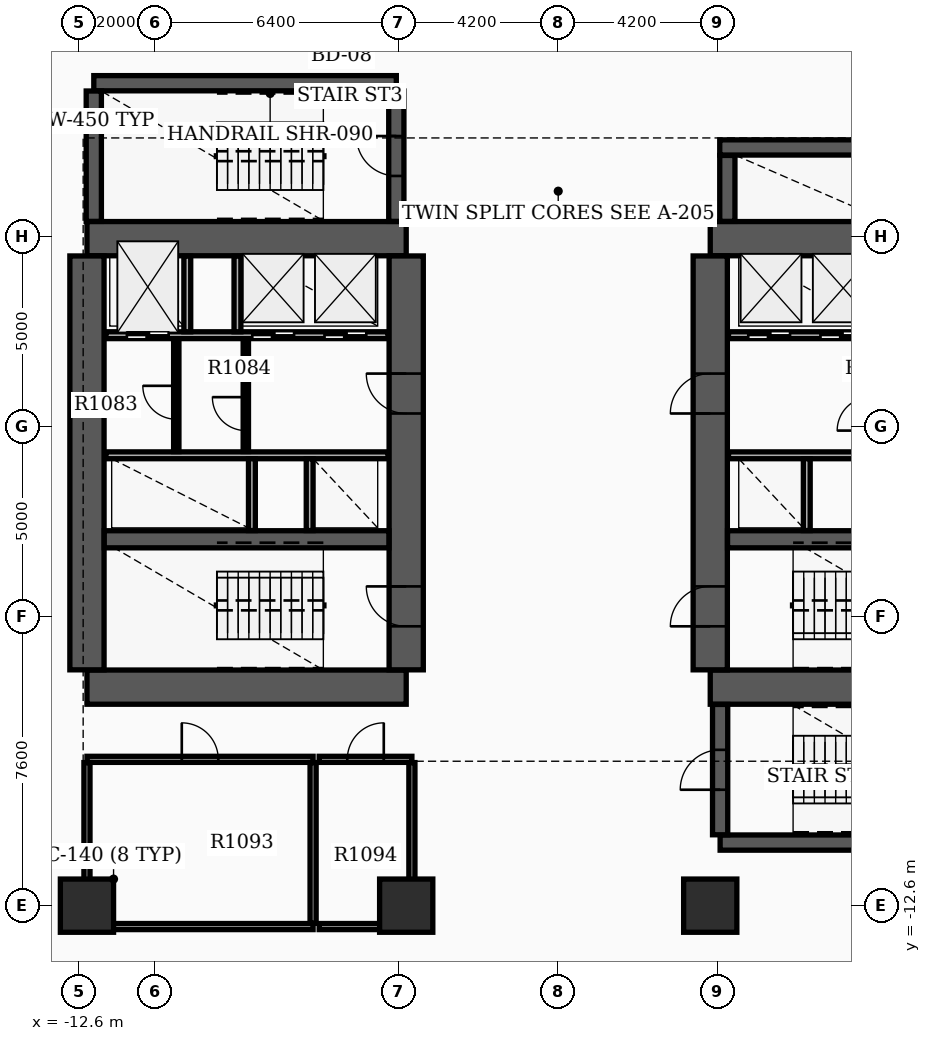
"""IFC4 building model, lengths in metres.
Left out: names, types, materials, properties, quantities, classifications, styles, units other than length and angle.
Written with IfcOpenShell. Run it as: python <this file> out.ifc"""

import sys

from ifc_helpers import new_model, si_unit, direction, frame, frame_2d, origin, origin_2d, place, context, subcontext, project, spatial, rectangle, extrude, element, fill, save


model = new_model("IFC4")
c1 = context("Model", 3, precision=1e-05, world=origin(), true_north=direction((0.0, 1.0)))
c2 = subcontext(c1, "Body", "Model", "MODEL_VIEW")
j1 = project(units=[si_unit("LENGTHUNIT", "METRE"), si_unit("PLANEANGLEUNIT", "RADIAN")], contexts=[c1])
p1 = place(None, origin())
s1 = spatial("IfcSite", under=j1, at=p1, CompositionType="ELEMENT")
p2 = place(p1, origin())
s2 = spatial("IfcBuilding", under=s1, at=p2, CompositionType="ELEMENT")
p3 = place(p2, frame((0.0, 0.0, 71.7)))
s3 = spatial("IfcBuildingStorey", under=s2, at=p3, CompositionType="ELEMENT", Elevation=71.7)
for number, where, z_axis, x_axis in (
    (1, (-12.4, -6.85, 0.0), (0.0, 0.0, 1.0), (1.0, 0.0, 0.0)),
    (2, (-12.4, 4.95, 0.0), (0.0, 0.0, 1.0), (1.0, 0.0, 0.0)),
):
    element("IfcWall", number, at=place(p3, frame(where, z_axis=z_axis, x_axis=x_axis)), inside=s3, PredefinedType="SHEAR", context=c2, shape_type="SweptSolid", body=[
        extrude(rectangle(XDim=8.4, YDim=0.9, at=frame_2d((4.2, 0.0))), origin(), (0.0, 0.0, 1.0), 3.7),
    ])
p4 = place(p3, frame((-12.4, -6.395, 0.0), z_axis=(0.0, 0.0, 1.0), x_axis=(0.0, 1.0, 0.0)))
e3 = element("IfcWall", 3, at=p4, inside=s3, PredefinedType="SHEAR", context=c2, shape_type="SweptSolid", body=[
    extrude(rectangle(XDim=10.89, YDim=0.9, at=frame_2d((5.445, 0.0))), origin(), (0.0, 0.0, 1.0), 3.7),
])
p5 = place(p3, frame((-4.0, -6.395, 0.0), z_axis=(0.0, 0.0, 1.0), x_axis=(0.0, 1.0, 0.0)))
e4 = element("IfcWall", 4, at=p5, inside=s3, PredefinedType="SHEAR", context=c2, shape_type="SweptSolid", body=[
    extrude(rectangle(XDim=10.89, YDim=0.9, at=frame_2d((5.445, 0.0))), origin(), (0.0, 0.0, 1.0), 3.7),
])
p6 = place(p5, frame((1.145, 0.0, 0.0)))
e5 = element("IfcOpeningElement", 5, at=p6, cuts=e4, PredefinedType="OPENING", context=c2, shape_type="SweptSolid", body=[
    extrude(rectangle(XDim=1.05, YDim=2.15, at=frame_2d((0.525, 1.075))), frame((0.0, 0.46, 0.0), z_axis=(0.0, -1.0, 0.0), x_axis=(1.0, 0.0, 0.0)), (0.0, 0.0, 1.0), 0.92),
])
p7 = place(p5, frame((6.745, 0.0, 0.0)))
e6 = element("IfcOpeningElement", 6, at=p7, cuts=e4, PredefinedType="OPENING", context=c2, shape_type="SweptSolid", body=[
    extrude(rectangle(XDim=1.05, YDim=2.15, at=frame_2d((0.525, 1.075))), frame((0.0, 0.46, 0.0), z_axis=(0.0, -1.0, 0.0), x_axis=(1.0, 0.0, 0.0)), (0.0, 0.0, 1.0), 0.92),
])
p8 = place(p3, frame((-11.945, -2.96, 0.0), z_axis=(0.0, 0.0, 1.0), x_axis=(1.0, 0.0, 0.0)))
e7 = element("IfcWall", 7, at=p8, inside=s3, PredefinedType="SHEAR", context=c2, shape_type="SweptSolid", body=[
    extrude(rectangle(XDim=7.49, YDim=0.45, at=frame_2d((3.745, 0.0))), origin(), (0.0, 0.0, 1.0), 3.7),
])
for number, where, z_axis, x_axis in (
    (8, (4.0, -6.85, 0.0), (0.0, 0.0, 1.0), (1.0, 0.0, 0.0)),
    (9, (4.0, 4.95, 0.0), (0.0, 0.0, 1.0), (1.0, 0.0, 0.0)),
):
    element("IfcWall", number, at=place(p3, frame(where, z_axis=z_axis, x_axis=x_axis)), inside=s3, PredefinedType="SHEAR", context=c2, shape_type="SweptSolid", body=[
        extrude(rectangle(XDim=8.4, YDim=0.9, at=frame_2d((4.2, 0.0))), origin(), (0.0, 0.0, 1.0), 3.7),
    ])
p9 = place(p3, frame((4.0, -6.395, 0.0), z_axis=(0.0, 0.0, 1.0), x_axis=(0.0, 1.0, 0.0)))
e10 = element("IfcWall", 10, at=p9, inside=s3, PredefinedType="SHEAR", context=c2, shape_type="SweptSolid", body=[
    extrude(rectangle(XDim=10.89, YDim=0.9, at=frame_2d((5.445, 0.0))), origin(), (0.0, 0.0, 1.0), 3.7),
])
p10 = place(p9, frame((1.145, 0.0, 0.0)))
e11 = element("IfcOpeningElement", 11, at=p10, cuts=e10, PredefinedType="OPENING", context=c2, shape_type="SweptSolid", body=[
    extrude(rectangle(XDim=1.05, YDim=2.15, at=frame_2d((0.525, 1.075))), frame((0.0, 0.46, 0.0), z_axis=(0.0, -1.0, 0.0), x_axis=(1.0, 0.0, 0.0)), (0.0, 0.0, 1.0), 0.92),
])
p11 = place(p9, frame((6.745, 0.0, 0.0)))
e12 = element("IfcOpeningElement", 12, at=p11, cuts=e10, PredefinedType="OPENING", context=c2, shape_type="SweptSolid", body=[
    extrude(rectangle(XDim=1.05, YDim=2.15, at=frame_2d((0.525, 1.075))), frame((0.0, 0.46, 0.0), z_axis=(0.0, -1.0, 0.0), x_axis=(1.0, 0.0, 0.0)), (0.0, 0.0, 1.0), 0.92),
])
p12 = place(p3, frame((4.455, -2.96, 0.0), z_axis=(0.0, 0.0, 1.0), x_axis=(1.0, 0.0, 0.0)))
e13 = element("IfcWall", 13, at=p12, inside=s3, PredefinedType="SHEAR", context=c2, shape_type="SweptSolid", body=[
    extrude(rectangle(XDim=7.49, YDim=0.45, at=frame_2d((3.745, 0.0))), origin(), (0.0, 0.0, 1.0), 3.7),
])
p13 = place(p3, frame((-12.22, 9.04, 0.0), z_axis=(0.0, 0.0, 1.0), x_axis=(1.0, 0.0, 0.0)))
e14 = element("IfcWall", 14, at=p13, inside=s3, PredefinedType="SHEAR", context=c2, shape_type="SweptSolid", body=[
    extrude(rectangle(XDim=7.96, YDim=0.4, at=frame_2d((3.98, 0.0))), origin(), (0.0, 0.0, 1.0), 3.7),
])
p14 = place(p3, frame((-12.22, 5.405, 0.0), z_axis=(0.0, 0.0, 1.0), x_axis=(0.0, 1.0, 0.0)))
e15 = element("IfcWall", 15, at=p14, inside=s3, PredefinedType="SHEAR", context=c2, shape_type="SweptSolid", body=[
    extrude(rectangle(XDim=3.43, YDim=0.4, at=frame_2d((1.715, 0.0))), origin(), (0.0, 0.0, 1.0), 3.7),
])
p15 = place(p3, frame((-4.26, 5.405, 0.0), z_axis=(0.0, 0.0, 1.0), x_axis=(0.0, 1.0, 0.0)))
e16 = element("IfcWall", 16, at=p15, inside=s3, PredefinedType="SHEAR", context=c2, shape_type="SweptSolid", body=[
    extrude(rectangle(XDim=3.43, YDim=0.4, at=frame_2d((1.715, 0.0))), origin(), (0.0, 0.0, 1.0), 3.7),
])
p16 = place(p15, frame((1.195, 0.0, 0.0)))
e17 = element("IfcOpeningElement", 17, at=p16, cuts=e16, PredefinedType="OPENING", context=c2, shape_type="SweptSolid", body=[
    extrude(rectangle(XDim=1.05, YDim=2.15, at=frame_2d((0.525, 1.075))), frame((0.0, 0.21, 0.0), z_axis=(0.0, -1.0, 0.0), x_axis=(1.0, 0.0, 0.0)), (0.0, 0.0, 1.0), 0.42),
])
p17 = place(p3, frame((4.26, -10.94, 0.0), z_axis=(0.0, 0.0, 1.0), x_axis=(1.0, 0.0, 0.0)))
e18 = element("IfcWall", 18, at=p17, inside=s3, PredefinedType="SHEAR", context=c2, shape_type="SweptSolid", body=[
    extrude(rectangle(XDim=7.96, YDim=0.4, at=frame_2d((3.98, 0.0))), origin(), (0.0, 0.0, 1.0), 3.7),
])
p18 = place(p3, frame((4.26, -10.735, 0.0), z_axis=(0.0, 0.0, 1.0), x_axis=(0.0, 1.0, 0.0)))
e19 = element("IfcWall", 19, at=p18, inside=s3, PredefinedType="SHEAR", context=c2, shape_type="SweptSolid", body=[
    extrude(rectangle(XDim=3.43, YDim=0.4, at=frame_2d((1.715, 0.0))), origin(), (0.0, 0.0, 1.0), 3.7),
])
p19 = place(p18, frame((1.185, 0.0, 0.0)))
e20 = element("IfcOpeningElement", 20, at=p19, cuts=e19, PredefinedType="OPENING", context=c2, shape_type="SweptSolid", body=[
    extrude(rectangle(XDim=1.05, YDim=2.15, at=frame_2d((0.525, 1.075))), frame((0.0, 0.21, 0.0), z_axis=(0.0, -1.0, 0.0), x_axis=(1.0, 0.0, 0.0)), (0.0, 0.0, 1.0), 0.42),
])
p20 = place(p3, frame((4.45, 5.405, 0.0), z_axis=(0.0, 0.0, 1.0), x_axis=(0.0, 1.0, 0.0)))
e21 = element("IfcWall", 21, at=p20, inside=s3, PredefinedType="SHEAR", context=c2, shape_type="SweptSolid", body=[
    extrude(rectangle(XDim=1.735, YDim=0.4, at=frame_2d((0.867, 0.0))), origin(), (0.0, 0.0, 1.0), 3.7),
])
p21 = place(p3, frame((4.25, 7.35, 0.0), z_axis=(0.0, 0.0, 1.0), x_axis=(1.0, 0.0, 0.0)))
e22 = element("IfcWall", 22, at=p21, inside=s3, PredefinedType="SHEAR", context=c2, shape_type="SweptSolid", body=[
    extrude(rectangle(XDim=5.4, YDim=0.4, at=frame_2d((2.7, 0.0))), origin(), (0.0, 0.0, 1.0), 3.7),
])
for number, where, z_axis, x_axis in (
    (23, (-12.4, -12.6, 0.0), (0.0, 0.0, 1.0), (1.0, 0.0, 0.0)),
    (24, (-4.0, -12.6, 0.0), (0.0, 0.0, 1.0), (1.0, 0.0, 0.0)),
    (25, (4.0, -12.6, 0.0), (0.0, 0.0, 1.0), (1.0, 0.0, 0.0)),
):
    element("IfcColumn", number, at=place(p3, frame(where, z_axis=z_axis, x_axis=x_axis)), inside=s3, PredefinedType="COLUMN", context=c2, shape_type="SweptSolid", body=[
        extrude(rectangle(XDim=1.4, YDim=1.4, at=origin_2d()), origin(), (0.0, 0.0, 1.0), 3.9),
    ])
p22 = place(p3, frame((-11.9, 2.41, 0.0), z_axis=(0.0, 0.0, 1.0), x_axis=(1.0, 0.0, 0.0)))
e26 = element("IfcWall", 26, at=p22, inside=s3, PredefinedType="SOLIDWALL", context=c2, shape_type="SweptSolid", body=[
    extrude(rectangle(XDim=7.42, YDim=0.18, at=frame_2d((3.71, 0.0))), origin(), (0.0, 0.0, 1.0), 2.9),
])
p23 = place(p22, frame((0.55, 0.0, 0.0)))
e27 = element("IfcOpeningElement", 27, at=p23, cuts=e26, PredefinedType="OPENING", context=c2, shape_type="SweptSolid", body=[
    extrude(rectangle(XDim=1.1, YDim=2.15, at=frame_2d((0.55, 1.075))), frame((0.0, 0.1, 0.0), z_axis=(0.0, -1.0, 0.0), x_axis=(1.0, 0.0, 0.0)), (0.0, 0.0, 1.0), 0.2),
])
p24 = place(p22, frame((3.85, 0.0, 0.0)))
e28 = element("IfcOpeningElement", 28, at=p24, cuts=e26, PredefinedType="OPENING", context=c2, shape_type="SweptSolid", body=[
    extrude(rectangle(XDim=1.1, YDim=2.15, at=frame_2d((0.55, 1.075))), frame((0.0, 0.1, 0.0), z_axis=(0.0, -1.0, 0.0), x_axis=(1.0, 0.0, 0.0)), (0.0, 0.0, 1.0), 0.2),
])
p25 = place(p22, frame((5.75, 0.0, 0.0)))
e29 = element("IfcOpeningElement", 29, at=p25, cuts=e26, PredefinedType="OPENING", context=c2, shape_type="SweptSolid", body=[
    extrude(rectangle(XDim=1.1, YDim=2.15, at=frame_2d((0.55, 1.075))), frame((0.0, 0.1, 0.0), z_axis=(0.0, -1.0, 0.0), x_axis=(1.0, 0.0, 0.0)), (0.0, 0.0, 1.0), 0.2),
])
p26 = place(p3, frame((4.48, 2.41, 0.0), z_axis=(0.0, 0.0, 1.0), x_axis=(1.0, 0.0, 0.0)))
e30 = element("IfcWall", 30, at=p26, inside=s3, PredefinedType="SOLIDWALL", context=c2, shape_type="SweptSolid", body=[
    extrude(rectangle(XDim=7.42, YDim=0.18, at=frame_2d((3.71, 0.0))), origin(), (0.0, 0.0, 1.0), 2.9),
])
p27 = place(p26, frame((5.67, 0.0, 0.0)))
e31 = element("IfcOpeningElement", 31, at=p27, cuts=e30, PredefinedType="OPENING", context=c2, shape_type="SweptSolid", body=[
    extrude(rectangle(XDim=1.1, YDim=2.15, at=frame_2d((0.55, 1.075))), frame((0.0, 0.1, 0.0), z_axis=(0.0, -1.0, 0.0), x_axis=(1.0, 0.0, 0.0)), (0.0, 0.0, 1.0), 0.2),
])
p28 = place(p26, frame((0.52, 0.0, 0.0)))
e32 = element("IfcOpeningElement", 32, at=p28, cuts=e30, PredefinedType="OPENING", context=c2, shape_type="SweptSolid", body=[
    extrude(rectangle(XDim=1.1, YDim=2.15, at=frame_2d((0.55, 1.075))), frame((0.0, 0.1, 0.0), z_axis=(0.0, -1.0, 0.0), x_axis=(1.0, 0.0, 0.0)), (0.0, 0.0, 1.0), 0.2),
])
p29 = place(p26, frame((2.42, 0.0, 0.0)))
e33 = element("IfcOpeningElement", 33, at=p29, cuts=e30, PredefinedType="OPENING", context=c2, shape_type="SweptSolid", body=[
    extrude(rectangle(XDim=1.1, YDim=2.15, at=frame_2d((0.55, 1.075))), frame((0.0, 0.1, 0.0), z_axis=(0.0, -1.0, 0.0), x_axis=(1.0, 0.0, 0.0)), (0.0, 0.0, 1.0), 0.2),
])
for number, where, z_axis, x_axis in (
    (34, (-11.9, -0.75, 0.0), (0.0, 0.0, 1.0), (1.0, 0.0, 0.0)),
    (35, (4.48, -0.75, 0.0), (0.0, 0.0, 1.0), (1.0, 0.0, 0.0)),
):
    element("IfcWall", number, at=place(p3, frame(where, z_axis=z_axis, x_axis=x_axis)), inside=s3, PredefinedType="SOLIDWALL", context=c2, shape_type="SweptSolid", body=[
        extrude(rectangle(XDim=7.42, YDim=0.18, at=frame_2d((3.71, 0.0))), origin(), (0.0, 0.0, 1.0), 2.9),
    ])
for number, where, z_axis, x_axis in (
    (36, (-9.76, 2.5, 0.0), (0.0, 0.0, 1.0), (0.0, 1.0, 0.0)),
    (37, (-8.44, 2.5, 0.0), (0.0, 0.0, 1.0), (0.0, 1.0, 0.0)),
):
    element("IfcWall", number, at=place(p3, frame(where, z_axis=z_axis, x_axis=x_axis)), inside=s3, PredefinedType="SOLIDWALL", context=c2, shape_type="SweptSolid", body=[
        extrude(rectangle(XDim=1.99, YDim=0.18, at=frame_2d((0.995, 0.0))), origin(), (0.0, 0.0, 1.0), 2.9),
    ])
for number, where, z_axis, x_axis in (
    (38, (-8.06, -2.73, 0.0), (0.0, 0.0, 1.0), (0.0, 1.0, 0.0)),
    (39, (-6.54, -2.73, 0.0), (0.0, 0.0, 1.0), (0.0, 1.0, 0.0)),
    (40, (6.54, -2.73, 0.0), (0.0, 0.0, 1.0), (0.0, 1.0, 0.0)),
):
    element("IfcWall", number, at=place(p3, frame(where, z_axis=z_axis, x_axis=x_axis)), inside=s3, PredefinedType="SOLIDWALL", context=c2, shape_type="SweptSolid", body=[
        extrude(rectangle(XDim=1.89, YDim=0.18, at=frame_2d((0.945, 0.0))), origin(), (0.0, 0.0, 1.0), 2.9),
    ])
p30 = place(p3, frame((-8.22, -0.65, 0.0), z_axis=(0.0, 0.0, 1.0), x_axis=(0.0, 1.0, 0.0)))
e41 = element("IfcWall", 41, at=p30, inside=s3, PredefinedType="SOLIDWALL", context=c2, shape_type="SweptSolid", body=[
    extrude(rectangle(XDim=2.96, YDim=0.14, at=frame_2d((1.48, 0.0))), origin(), (0.0, 0.0, 1.0), 2.9),
])
p31 = place(p30, frame((0.55, 0.0, 0.0)))
e42 = element("IfcOpeningElement", 42, at=p31, cuts=e41, PredefinedType="OPENING", context=c2, shape_type="SweptSolid", body=[
    extrude(rectangle(XDim=0.88, YDim=2.1, at=frame_2d((0.44, 1.05))), frame((0.0, 0.08, 0.0), z_axis=(0.0, -1.0, 0.0), x_axis=(1.0, 0.0, 0.0)), (0.0, 0.0, 1.0), 0.16),
])
p32 = place(p3, frame((-10.05, -0.652, 0.0), z_axis=(0.0, 0.0, 1.0), x_axis=(0.0, 1.0, 0.0)))
e43 = element("IfcWall", 43, at=p32, inside=s3, PredefinedType="PARTITIONING", context=c2, shape_type="SweptSolid", body=[
    extrude(rectangle(XDim=2.962, YDim=0.14, at=frame_2d((1.481, 0.0))), origin(), (0.0, 0.0, 1.0), 2.9),
])
p33 = place(p32, frame((0.85, 0.0, 0.0)))
e44 = element("IfcOpeningElement", 44, at=p33, cuts=e43, PredefinedType="OPENING", context=c2, shape_type="SweptSolid", body=[
    extrude(rectangle(XDim=0.88, YDim=2.1, at=frame_2d((0.44, 1.05))), frame((0.0, 0.08, 0.0), z_axis=(0.0, -1.0, 0.0), x_axis=(1.0, 0.0, 0.0)), (0.0, 0.0, 1.0), 0.16),
])
p34 = place(p3, frame((-12.4, -13.15, 0.0), z_axis=(0.0, 0.0, 1.0), x_axis=(1.0, 0.0, 0.0)))
e45 = element("IfcWall", 45, at=p34, inside=s3, PredefinedType="PARTITIONING", context=c2, shape_type="SweptSolid", body=[
    extrude(rectangle(XDim=5.95, YDim=0.16, at=frame_2d((2.975, 0.0))), origin(), (0.0, 0.0, 1.0), 2.9),
])
p35 = place(p3, frame((-12.4, -8.75, 0.0), z_axis=(0.0, 0.0, 1.0), x_axis=(1.0, 0.0, 0.0)))
e46 = element("IfcWall", 46, at=p35, inside=s3, PredefinedType="PARTITIONING", context=c2, shape_type="SweptSolid", body=[
    extrude(rectangle(XDim=5.95, YDim=0.16, at=frame_2d((2.975, 0.0))), origin(), (0.0, 0.0, 1.0), 2.9),
])
p36 = place(p35, frame((2.495, 0.0, 0.0)))
e47 = element("IfcOpeningElement", 47, at=p36, cuts=e46, PredefinedType="OPENING", context=c2, shape_type="SweptSolid", body=[
    extrude(rectangle(XDim=0.96, YDim=2.15, at=frame_2d((0.48, 1.075))), frame((0.0, 0.09, 0.0), z_axis=(0.0, -1.0, 0.0), x_axis=(1.0, 0.0, 0.0)), (0.0, 0.0, 1.0), 0.18),
])
for number, where, z_axis, x_axis in (
    (48, (-12.4, -13.065, 0.0), (0.0, 0.0, 1.0), (0.0, 1.0, 0.0)),
    (49, (-6.45, -13.065, 0.0), (0.0, 0.0, 1.0), (0.0, 1.0, 0.0)),
):
    element("IfcWall", number, at=place(p3, frame(where, z_axis=z_axis, x_axis=x_axis)), inside=s3, PredefinedType="PARTITIONING", context=c2, shape_type="SweptSolid", body=[
        extrude(rectangle(XDim=4.23, YDim=0.16, at=frame_2d((2.115, 0.0))), origin(), (0.0, 0.0, 1.0), 2.9),
    ])
p37 = place(p3, frame((-6.29, -13.15, 0.0), z_axis=(0.0, 0.0, 1.0), x_axis=(1.0, 0.0, 0.0)))
e50 = element("IfcWall", 50, at=p37, inside=s3, PredefinedType="PARTITIONING", context=c2, shape_type="SweptSolid", body=[
    extrude(rectangle(XDim=2.44, YDim=0.16, at=frame_2d((1.22, 0.0))), origin(), (0.0, 0.0, 1.0), 2.9),
])
p38 = place(p3, frame((-6.29, -8.75, 0.0), z_axis=(0.0, 0.0, 1.0), x_axis=(1.0, 0.0, 0.0)))
e51 = element("IfcWall", 51, at=p38, inside=s3, PredefinedType="PARTITIONING", context=c2, shape_type="SweptSolid", body=[
    extrude(rectangle(XDim=2.44, YDim=0.16, at=frame_2d((1.22, 0.0))), origin(), (0.0, 0.0, 1.0), 2.9),
])
p39 = place(p38, frame((0.74, 0.0, 0.0)))
e52 = element("IfcOpeningElement", 52, at=p39, cuts=e51, PredefinedType="OPENING", context=c2, shape_type="SweptSolid", body=[
    extrude(rectangle(XDim=0.96, YDim=2.15, at=frame_2d((0.48, 1.075))), frame((0.0, 0.09, 0.0), z_axis=(0.0, -1.0, 0.0), x_axis=(1.0, 0.0, 0.0)), (0.0, 0.0, 1.0), 0.18),
])
p40 = place(p3, frame((-3.85, -13.065, 0.0), z_axis=(0.0, 0.0, 1.0), x_axis=(0.0, 1.0, 0.0)))
e53 = element("IfcWall", 53, at=p40, inside=s3, PredefinedType="PARTITIONING", context=c2, shape_type="SweptSolid", body=[
    extrude(rectangle(XDim=4.23, YDim=0.16, at=frame_2d((2.115, 0.0))), origin(), (0.0, 0.0, 1.0), 2.9),
])
p41 = place(p6, origin())
e54 = element("IfcDoor", 54, at=p41, inside=s3, OperationType="SINGLE_SWING_RIGHT", PredefinedType="DOOR", context=c2, shape_type="SweptSolid", body=[
    extrude(rectangle(XDim=1.05, YDim=2.15, at=frame_2d((0.525, 1.075))), frame((0.0, 0.025, 0.0), z_axis=(0.0, -1.0, 0.0), x_axis=(1.0, 0.0, 0.0)), (0.0, 0.0, 1.0), 0.05),
])
fill(e5, e54)
p42 = place(p10, origin())
e55 = element("IfcDoor", 55, at=p42, inside=s3, OperationType="SINGLE_SWING_LEFT", PredefinedType="DOOR", context=c2, shape_type="SweptSolid", body=[
    extrude(rectangle(XDim=1.05, YDim=2.15, at=frame_2d((0.525, 1.075))), frame((0.0, 0.025, 0.0), z_axis=(0.0, -1.0, 0.0), x_axis=(1.0, 0.0, 0.0)), (0.0, 0.0, 1.0), 0.05),
])
fill(e11, e55)
p43 = place(p7, origin())
e56 = element("IfcDoor", 56, at=p43, inside=s3, OperationType="SINGLE_SWING_RIGHT", PredefinedType="DOOR", context=c2, shape_type="SweptSolid", body=[
    extrude(rectangle(XDim=1.05, YDim=2.15, at=frame_2d((0.525, 1.075))), frame((0.0, 0.025, 0.0), z_axis=(0.0, -1.0, 0.0), x_axis=(1.0, 0.0, 0.0)), (0.0, 0.0, 1.0), 0.05),
])
fill(e6, e56)
p44 = place(p11, origin())
e57 = element("IfcDoor", 57, at=p44, inside=s3, OperationType="SINGLE_SWING_LEFT", PredefinedType="DOOR", context=c2, shape_type="SweptSolid", body=[
    extrude(rectangle(XDim=1.05, YDim=2.15, at=frame_2d((0.525, 1.075))), frame((0.0, 0.025, 0.0), z_axis=(0.0, -1.0, 0.0), x_axis=(1.0, 0.0, 0.0)), (0.0, 0.0, 1.0), 0.05),
])
fill(e12, e57)
p45 = place(p16, origin())
e58 = element("IfcDoor", 58, at=p45, inside=s3, OperationType="SINGLE_SWING_RIGHT", PredefinedType="DOOR", context=c2, shape_type="SweptSolid", body=[
    extrude(rectangle(XDim=1.05, YDim=2.15, at=frame_2d((0.525, 1.075))), frame((0.0, 0.025, 0.0), z_axis=(0.0, -1.0, 0.0), x_axis=(1.0, 0.0, 0.0)), (0.0, 0.0, 1.0), 0.05),
])
fill(e17, e58)
p46 = place(p19, origin())
e59 = element("IfcDoor", 59, at=p46, inside=s3, OperationType="SINGLE_SWING_LEFT", PredefinedType="DOOR", context=c2, shape_type="SweptSolid", body=[
    extrude(rectangle(XDim=1.05, YDim=2.15, at=frame_2d((0.525, 1.075))), frame((0.0, 0.025, 0.0), z_axis=(0.0, -1.0, 0.0), x_axis=(1.0, 0.0, 0.0)), (0.0, 0.0, 1.0), 0.05),
])
fill(e20, e59)
p47 = place(p23, origin())
e60 = element("IfcDoor", 60, at=p47, inside=s3, OperationType="DOUBLE_DOOR_SLIDING", PredefinedType="DOOR", context=c2, shape_type="SweptSolid", body=[
    extrude(rectangle(XDim=1.1, YDim=2.15, at=frame_2d((0.55, 1.075))), frame((0.0, 0.025, 0.0), z_axis=(0.0, -1.0, 0.0), x_axis=(1.0, 0.0, 0.0)), (0.0, 0.0, 1.0), 0.05),
])
fill(e27, e60)
p48 = place(p24, origin())
e61 = element("IfcDoor", 61, at=p48, inside=s3, OperationType="DOUBLE_DOOR_SLIDING", PredefinedType="DOOR", context=c2, shape_type="SweptSolid", body=[
    extrude(rectangle(XDim=1.1, YDim=2.15, at=frame_2d((0.55, 1.075))), frame((0.0, 0.025, 0.0), z_axis=(0.0, -1.0, 0.0), x_axis=(1.0, 0.0, 0.0)), (0.0, 0.0, 1.0), 0.05),
])
fill(e28, e61)
p49 = place(p25, origin())
e62 = element("IfcDoor", 62, at=p49, inside=s3, OperationType="DOUBLE_DOOR_SLIDING", PredefinedType="DOOR", context=c2, shape_type="SweptSolid", body=[
    extrude(rectangle(XDim=1.1, YDim=2.15, at=frame_2d((0.55, 1.075))), frame((0.0, 0.025, 0.0), z_axis=(0.0, -1.0, 0.0), x_axis=(1.0, 0.0, 0.0)), (0.0, 0.0, 1.0), 0.05),
])
fill(e29, e62)
p50 = place(p28, origin())
e63 = element("IfcDoor", 63, at=p50, inside=s3, OperationType="DOUBLE_DOOR_SLIDING", PredefinedType="DOOR", context=c2, shape_type="SweptSolid", body=[
    extrude(rectangle(XDim=1.1, YDim=2.15, at=frame_2d((0.55, 1.075))), frame((0.0, 0.025, 0.0), z_axis=(0.0, -1.0, 0.0), x_axis=(1.0, 0.0, 0.0)), (0.0, 0.0, 1.0), 0.05),
])
fill(e32, e63)
p51 = place(p29, origin())
e64 = element("IfcDoor", 64, at=p51, inside=s3, OperationType="DOUBLE_DOOR_SLIDING", PredefinedType="DOOR", context=c2, shape_type="SweptSolid", body=[
    extrude(rectangle(XDim=1.1, YDim=2.15, at=frame_2d((0.55, 1.075))), frame((0.0, 0.025, 0.0), z_axis=(0.0, -1.0, 0.0), x_axis=(1.0, 0.0, 0.0)), (0.0, 0.0, 1.0), 0.05),
])
fill(e33, e64)
p52 = place(p31, origin())
e65 = element("IfcDoor", 65, at=p52, inside=s3, OperationType="SINGLE_SWING_RIGHT", PredefinedType="DOOR", context=c2, shape_type="SweptSolid", body=[
    extrude(rectangle(XDim=0.88, YDim=2.1, at=frame_2d((0.44, 1.05))), frame((0.0, 0.025, 0.0), z_axis=(0.0, -1.0, 0.0), x_axis=(1.0, 0.0, 0.0)), (0.0, 0.0, 1.0), 0.05),
])
fill(e42, e65)
p53 = place(p33, origin())
e66 = element("IfcDoor", 66, at=p53, inside=s3, OperationType="SINGLE_SWING_RIGHT", PredefinedType="DOOR", context=c2, shape_type="SweptSolid", body=[
    extrude(rectangle(XDim=0.88, YDim=2.1, at=frame_2d((0.44, 1.05))), frame((0.0, 0.025, 0.0), z_axis=(0.0, -1.0, 0.0), x_axis=(1.0, 0.0, 0.0)), (0.0, 0.0, 1.0), 0.05),
])
fill(e44, e66)
p54 = place(p36, origin())
e67 = element("IfcDoor", 67, at=p54, inside=s3, OperationType="SINGLE_SWING_LEFT", PredefinedType="DOOR", context=c2, shape_type="SweptSolid", body=[
    extrude(rectangle(XDim=0.96, YDim=2.15, at=frame_2d((0.48, 1.075))), frame((0.0, 0.025, 0.0), z_axis=(0.0, -1.0, 0.0), x_axis=(1.0, 0.0, 0.0)), (0.0, 0.0, 1.0), 0.05),
])
fill(e47, e67)
p55 = place(p39, origin())
e68 = element("IfcDoor", 68, at=p55, inside=s3, OperationType="SINGLE_SWING_RIGHT", PredefinedType="DOOR", context=c2, shape_type="SweptSolid", body=[
    extrude(rectangle(XDim=0.96, YDim=2.15, at=frame_2d((0.48, 1.075))), frame((0.0, 0.025, 0.0), z_axis=(0.0, -1.0, 0.0), x_axis=(1.0, 0.0, 0.0)), (0.0, 0.0, 1.0), 0.05),
])
fill(e52, e68)
save(model, sys.argv[1])
